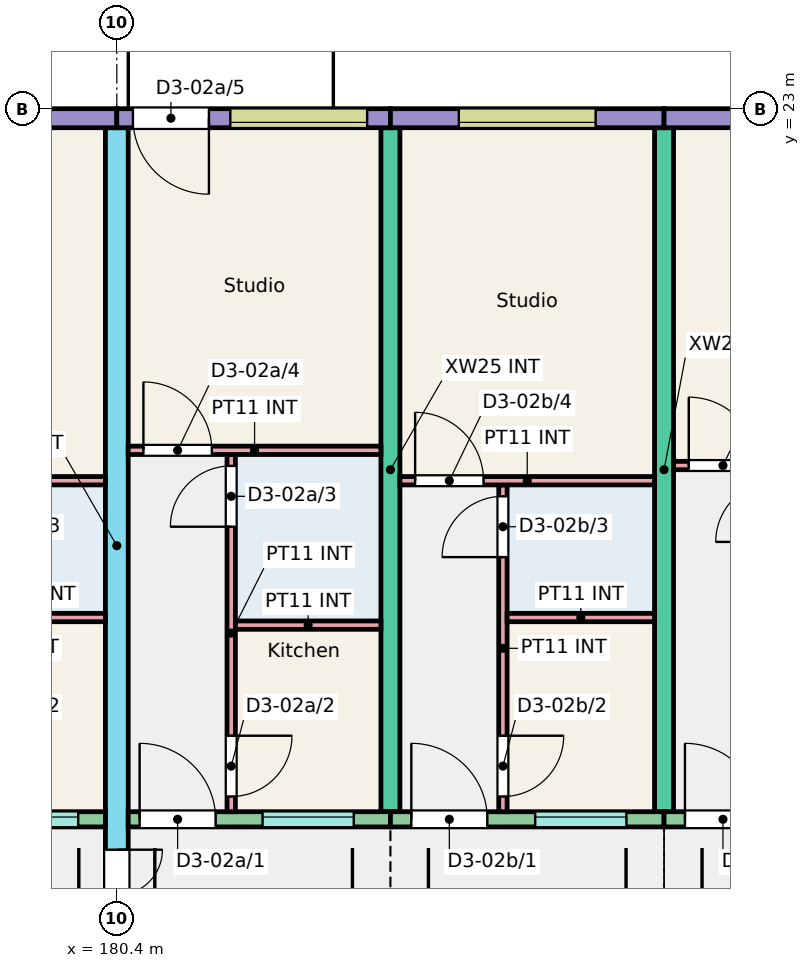
"""IFC4 building model, lengths in metres.
Left out: names, types, materials, properties, quantities, classifications, styles, units other than length and angle.
Written with IfcOpenShell. Run it as: python <this file> out.ifc"""

import sys

from ifc_helpers import new_model, si_unit, direction, frame, frame_2d, origin, place, context, subcontext, project, spatial, rectangle, extrude, element, fill, save


model = new_model("IFC4")
c1 = context("Model", 3, precision=1e-05, world=origin(), true_north=direction((0.0, 1.0)))
c2 = subcontext(c1, "Body", "Model", "MODEL_VIEW")
j1 = project(units=[si_unit("LENGTHUNIT", "METRE"), si_unit("PLANEANGLEUNIT", "RADIAN")], contexts=[c1])
p1 = place(None, origin())
s1 = spatial("IfcSite", under=j1, at=p1, CompositionType="ELEMENT")
p2 = place(p1, origin())
s2 = spatial("IfcBuilding", under=s1, at=p2, CompositionType="ELEMENT")
p3 = place(p2, frame((0.0, 0.0, 6.0)))
s3 = spatial("IfcBuildingStorey", under=s2, at=p3, CompositionType="ELEMENT", Elevation=6.0)
p4 = place(p3, frame((180.4, 11.75, 0.0), z_axis=(0.0, 0.0, 1.0), x_axis=(0.0, 1.0, 0.0)))
e1 = element("IfcWall", 1, at=p4, inside=s3, PredefinedType="SHEAR", context=c2, shape_type="SweptSolid", body=[
    extrude(rectangle(XDim=11.0, YDim=0.3, at=frame_2d((5.5, 0.0))), origin(), (0.0, 0.0, 1.0), 3.0),
])
p5 = place(p4, frame((0.3, 0.0, 0.0)))
e2 = element("IfcOpeningElement", 2, at=p5, cuts=e1, PredefinedType="OPENING", context=c2, shape_type="SweptSolid", body=[
    extrude(rectangle(XDim=1.2, YDim=2.1, at=frame_2d((0.6, 1.05))), frame((0.0, 0.16, 0.0), z_axis=(0.0, -1.0, 0.0), x_axis=(1.0, 0.0, 0.0)), (0.0, 0.0, 1.0), 0.32),
])
for number, where, z_axis, x_axis in (
    (3, (184.0, 13.75, 0.0), (0.0, 0.0, 1.0), (0.0, 1.0, 0.0)),
    (4, (187.6, 13.75, 0.0), (0.0, 0.0, 1.0), (0.0, 1.0, 0.0)),
):
    element("IfcWall", number, at=place(p3, frame(where, z_axis=z_axis, x_axis=x_axis)), inside=s3, PredefinedType="SHEAR", context=c2, shape_type="SweptSolid", body=[
        extrude(rectangle(XDim=9.0, YDim=0.25, at=frame_2d((4.5, 0.0))), origin(), (0.0, 0.0, 1.0), 3.0),
    ])
p6 = place(p3, frame((176.8, 22.875, 0.0), z_axis=(0.0, 0.0, 1.0), x_axis=(1.0, 0.0, 0.0)))
e5 = element("IfcWall", 5, at=p6, inside=s3, PredefinedType="SOLIDWALL", context=c2, shape_type="SweptSolid", body=[
    extrude(rectangle(XDim=3.6, YDim=0.25, at=frame_2d((1.8, 0.0))), origin(), (0.0, 0.0, 1.0), 3.0),
])
p7 = place(p6, frame((0.887, 0.0, 1.1)))
e6 = element("IfcOpeningElement", 6, at=p7, cuts=e5, PredefinedType="OPENING", context=c2, shape_type="SweptSolid", body=[
    extrude(rectangle(XDim=1.8, YDim=1.3, at=frame_2d((0.9, 0.65))), frame((0.0, 0.135, 0.0), z_axis=(0.0, -1.0, 0.0), x_axis=(1.0, 0.0, 0.0)), (0.0, 0.0, 1.0), 0.27),
])
p8 = place(p3, frame((176.8, 13.65, 0.0), z_axis=(0.0, 0.0, 1.0), x_axis=(1.0, 0.0, 0.0)))
e7 = element("IfcWall", 7, at=p8, inside=s3, PredefinedType="SOLIDWALL", context=c2, shape_type="SweptSolid", body=[
    extrude(rectangle(XDim=3.45, YDim=0.2, at=frame_2d((1.725, 0.0))), origin(), (0.0, 0.0, 1.0), 3.0),
])
p9 = place(p8, frame((1.893, 0.0, 1.1)))
e8 = element("IfcOpeningElement", 8, at=p9, cuts=e7, PredefinedType="OPENING", context=c2, shape_type="SweptSolid", body=[
    extrude(rectangle(XDim=1.2, YDim=1.3, at=frame_2d((0.6, 0.65))), frame((0.0, 0.11, 0.0), z_axis=(0.0, -1.0, 0.0), x_axis=(1.0, 0.0, 0.0)), (0.0, 0.0, 1.0), 0.22),
])
p10 = place(p8, frame((0.275, 0.0, 0.0)))
e9 = element("IfcOpeningElement", 9, at=p10, cuts=e7, PredefinedType="OPENING", context=c2, shape_type="SweptSolid", body=[
    extrude(rectangle(XDim=1.0, YDim=2.1, at=frame_2d((0.5, 1.05))), frame((0.0, 0.11, 0.0), z_axis=(0.0, -1.0, 0.0), x_axis=(1.0, 0.0, 0.0)), (0.0, 0.0, 1.0), 0.22),
])
p11 = place(p3, frame((180.4, 22.875, 0.0), z_axis=(0.0, 0.0, 1.0), x_axis=(1.0, 0.0, 0.0)))
e10 = element("IfcWall", 10, at=p11, inside=s3, PredefinedType="SOLIDWALL", context=c2, shape_type="SweptSolid", body=[
    extrude(rectangle(XDim=3.6, YDim=0.25, at=frame_2d((1.8, 0.0))), origin(), (0.0, 0.0, 1.0), 3.0),
])
p12 = place(p11, frame((1.493, 0.0, 1.1)))
e11 = element("IfcOpeningElement", 11, at=p12, cuts=e10, PredefinedType="OPENING", context=c2, shape_type="SweptSolid", body=[
    extrude(rectangle(XDim=1.8, YDim=1.3, at=frame_2d((0.9, 0.65))), frame((0.0, 0.135, 0.0), z_axis=(0.0, -1.0, 0.0), x_axis=(1.0, 0.0, 0.0)), (0.0, 0.0, 1.0), 0.27),
])
p13 = place(p11, frame((0.212, 0.0, 0.0)))
e12 = element("IfcOpeningElement", 12, at=p13, cuts=e10, PredefinedType="OPENING", context=c2, shape_type="SweptSolid", body=[
    extrude(rectangle(XDim=1.0, YDim=2.1, at=frame_2d((0.5, 1.05))), frame((0.0, 0.135, 0.0), z_axis=(0.0, -1.0, 0.0), x_axis=(1.0, 0.0, 0.0)), (0.0, 0.0, 1.0), 0.27),
])
p14 = place(p3, frame((180.55, 13.65, 0.0), z_axis=(0.0, 0.0, 1.0), x_axis=(1.0, 0.0, 0.0)))
e13 = element("IfcWall", 13, at=p14, inside=s3, PredefinedType="SOLIDWALL", context=c2, shape_type="SweptSolid", body=[
    extrude(rectangle(XDim=3.45, YDim=0.2, at=frame_2d((1.725, 0.0))), origin(), (0.0, 0.0, 1.0), 3.0),
])
p15 = place(p14, frame((1.768, 0.0, 1.1)))
e14 = element("IfcOpeningElement", 14, at=p15, cuts=e13, PredefinedType="OPENING", context=c2, shape_type="SweptSolid", body=[
    extrude(rectangle(XDim=1.2, YDim=1.3, at=frame_2d((0.6, 0.65))), frame((0.0, 0.11, 0.0), z_axis=(0.0, -1.0, 0.0), x_axis=(1.0, 0.0, 0.0)), (0.0, 0.0, 1.0), 0.22),
])
p16 = place(p14, frame((0.15, 0.0, 0.0)))
e15 = element("IfcOpeningElement", 15, at=p16, cuts=e13, PredefinedType="OPENING", context=c2, shape_type="SweptSolid", body=[
    extrude(rectangle(XDim=1.0, YDim=2.1, at=frame_2d((0.5, 1.05))), frame((0.0, 0.11, 0.0), z_axis=(0.0, -1.0, 0.0), x_axis=(1.0, 0.0, 0.0)), (0.0, 0.0, 1.0), 0.22),
])
p17 = place(p3, frame((184.0, 22.875, 0.0), z_axis=(0.0, 0.0, 1.0), x_axis=(1.0, 0.0, 0.0)))
e16 = element("IfcWall", 16, at=p17, inside=s3, PredefinedType="SOLIDWALL", context=c2, shape_type="SweptSolid", body=[
    extrude(rectangle(XDim=3.6, YDim=0.25, at=frame_2d((1.8, 0.0))), origin(), (0.0, 0.0, 1.0), 3.0),
])
p18 = place(p17, frame((0.9, 0.0, 1.1)))
e17 = element("IfcOpeningElement", 17, at=p18, cuts=e16, PredefinedType="OPENING", context=c2, shape_type="SweptSolid", body=[
    extrude(rectangle(XDim=1.8, YDim=1.3, at=frame_2d((0.9, 0.65))), frame((0.0, 0.135, 0.0), z_axis=(0.0, -1.0, 0.0), x_axis=(1.0, 0.0, 0.0)), (0.0, 0.0, 1.0), 0.27),
])
p19 = place(p3, frame((184.0, 13.65, 0.0), z_axis=(0.0, 0.0, 1.0), x_axis=(1.0, 0.0, 0.0)))
e18 = element("IfcWall", 18, at=p19, inside=s3, PredefinedType="SOLIDWALL", context=c2, shape_type="SweptSolid", body=[
    extrude(rectangle(XDim=3.6, YDim=0.2, at=frame_2d((1.8, 0.0))), origin(), (0.0, 0.0, 1.0), 3.0),
])
p20 = place(p19, frame((1.905, 0.0, 1.1)))
e19 = element("IfcOpeningElement", 19, at=p20, cuts=e18, PredefinedType="OPENING", context=c2, shape_type="SweptSolid", body=[
    extrude(rectangle(XDim=1.2, YDim=1.3, at=frame_2d((0.6, 0.65))), frame((0.0, 0.11, 0.0), z_axis=(0.0, -1.0, 0.0), x_axis=(1.0, 0.0, 0.0)), (0.0, 0.0, 1.0), 0.22),
])
p21 = place(p19, frame((0.275, 0.0, 0.0)))
e20 = element("IfcOpeningElement", 20, at=p21, cuts=e18, PredefinedType="OPENING", context=c2, shape_type="SweptSolid", body=[
    extrude(rectangle(XDim=1.0, YDim=2.1, at=frame_2d((0.5, 1.05))), frame((0.0, 0.11, 0.0), z_axis=(0.0, -1.0, 0.0), x_axis=(1.0, 0.0, 0.0)), (0.0, 0.0, 1.0), 0.22),
])
p22 = place(p3, frame((187.6, 22.875, 0.0), z_axis=(0.0, 0.0, 1.0), x_axis=(1.0, 0.0, 0.0)))
e21 = element("IfcWall", 21, at=p22, inside=s3, PredefinedType="SOLIDWALL", context=c2, shape_type="SweptSolid", body=[
    extrude(rectangle(XDim=3.6, YDim=0.25, at=frame_2d((1.8, 0.0))), origin(), (0.0, 0.0, 1.0), 3.0),
])
p23 = place(p22, frame((0.9, 0.0, 1.1)))
e22 = element("IfcOpeningElement", 22, at=p23, cuts=e21, PredefinedType="OPENING", context=c2, shape_type="SweptSolid", body=[
    extrude(rectangle(XDim=1.8, YDim=1.3, at=frame_2d((0.9, 0.65))), frame((0.0, 0.135, 0.0), z_axis=(0.0, -1.0, 0.0), x_axis=(1.0, 0.0, 0.0)), (0.0, 0.0, 1.0), 0.27),
])
p24 = place(p3, frame((187.6, 13.65, 0.0), z_axis=(0.0, 0.0, 1.0), x_axis=(1.0, 0.0, 0.0)))
e23 = element("IfcWall", 23, at=p24, inside=s3, PredefinedType="SOLIDWALL", context=c2, shape_type="SweptSolid", body=[
    extrude(rectangle(XDim=3.6, YDim=0.2, at=frame_2d((1.8, 0.0))), origin(), (0.0, 0.0, 1.0), 3.0),
])
p25 = place(p24, frame((1.905, 0.0, 1.1)))
e24 = element("IfcOpeningElement", 24, at=p25, cuts=e23, PredefinedType="OPENING", context=c2, shape_type="SweptSolid", body=[
    extrude(rectangle(XDim=1.2, YDim=1.3, at=frame_2d((0.6, 0.65))), frame((0.0, 0.11, 0.0), z_axis=(0.0, -1.0, 0.0), x_axis=(1.0, 0.0, 0.0)), (0.0, 0.0, 1.0), 0.22),
])
p26 = place(p24, frame((0.275, 0.0, 0.0)))
e25 = element("IfcOpeningElement", 25, at=p26, cuts=e23, PredefinedType="OPENING", context=c2, shape_type="SweptSolid", body=[
    extrude(rectangle(XDim=1.0, YDim=2.1, at=frame_2d((0.5, 1.05))), frame((0.0, 0.11, 0.0), z_axis=(0.0, -1.0, 0.0), x_axis=(1.0, 0.0, 0.0)), (0.0, 0.0, 1.0), 0.22),
])
p27 = place(p3, frame((178.335, 16.305, 0.0), z_axis=(0.0, 0.0, 1.0), x_axis=(1.0, 0.0, 0.0)))
e26 = element("IfcWall", 26, at=p27, inside=s3, PredefinedType="PARTITIONING", context=c2, shape_type="SweptSolid", body=[
    extrude(rectangle(XDim=1.915, YDim=0.11, at=frame_2d((0.958, 0.0))), origin(), (0.0, 0.0, 1.0), 2.8),
])
p28 = place(p3, frame((176.925, 18.105, 0.0), z_axis=(0.0, 0.0, 1.0), x_axis=(1.0, 0.0, 0.0)))
e27 = element("IfcWall", 27, at=p28, inside=s3, PredefinedType="PARTITIONING", context=c2, shape_type="SweptSolid", body=[
    extrude(rectangle(XDim=3.325, YDim=0.11, at=frame_2d((1.663, 0.0))), origin(), (0.0, 0.0, 1.0), 2.8),
])
p29 = place(p28, frame((0.2, 0.0, 0.0)))
e28 = element("IfcOpeningElement", 28, at=p29, cuts=e27, PredefinedType="OPENING", context=c2, shape_type="SweptSolid", body=[
    extrude(rectangle(XDim=0.9, YDim=2.1, at=frame_2d((0.45, 1.05))), frame((0.0, 0.065, 0.0), z_axis=(0.0, -1.0, 0.0), x_axis=(1.0, 0.0, 0.0)), (0.0, 0.0, 1.0), 0.13),
])
p30 = place(p3, frame((181.905, 13.75, 0.0), z_axis=(0.0, 0.0, 1.0), x_axis=(0.0, 1.0, 0.0)))
e29 = element("IfcWall", 29, at=p30, inside=s3, PredefinedType="PARTITIONING", context=c2, shape_type="SweptSolid", body=[
    extrude(rectangle(XDim=4.7, YDim=0.11, at=frame_2d((2.35, 0.0))), origin(), (0.0, 0.0, 1.0), 2.8),
])
p31 = place(p30, frame((0.2, 0.0, 0.0)))
e30 = element("IfcOpeningElement", 30, at=p31, cuts=e29, PredefinedType="OPENING", context=c2, shape_type="SweptSolid", body=[
    extrude(rectangle(XDim=0.8, YDim=2.1, at=frame_2d((0.4, 1.05))), frame((0.0, 0.065, 0.0), z_axis=(0.0, -1.0, 0.0), x_axis=(1.0, 0.0, 0.0)), (0.0, 0.0, 1.0), 0.13),
])
p32 = place(p30, frame((3.75, 0.0, 0.0)))
e31 = element("IfcOpeningElement", 31, at=p32, cuts=e29, PredefinedType="OPENING", context=c2, shape_type="SweptSolid", body=[
    extrude(rectangle(XDim=0.8, YDim=2.1, at=frame_2d((0.4, 1.05))), frame((0.0, 0.065, 0.0), z_axis=(0.0, -1.0, 0.0), x_axis=(1.0, 0.0, 0.0)), (0.0, 0.0, 1.0), 0.13),
])
p33 = place(p3, frame((181.96, 16.205, 0.0), z_axis=(0.0, 0.0, 1.0), x_axis=(1.0, 0.0, 0.0)))
e32 = element("IfcWall", 32, at=p33, inside=s3, PredefinedType="PARTITIONING", context=c2, shape_type="SweptSolid", body=[
    extrude(rectangle(XDim=1.915, YDim=0.11, at=frame_2d((0.958, 0.0))), origin(), (0.0, 0.0, 1.0), 2.8),
])
p34 = place(p3, frame((180.55, 18.505, 0.0), z_axis=(0.0, 0.0, 1.0), x_axis=(1.0, 0.0, 0.0)))
e33 = element("IfcWall", 33, at=p34, inside=s3, PredefinedType="PARTITIONING", context=c2, shape_type="SweptSolid", body=[
    extrude(rectangle(XDim=3.325, YDim=0.11, at=frame_2d((1.663, 0.0))), origin(), (0.0, 0.0, 1.0), 2.8),
])
p35 = place(p34, frame((0.2, 0.0, 0.0)))
e34 = element("IfcOpeningElement", 34, at=p35, cuts=e33, PredefinedType="OPENING", context=c2, shape_type="SweptSolid", body=[
    extrude(rectangle(XDim=0.9, YDim=2.1, at=frame_2d((0.45, 1.05))), frame((0.0, 0.065, 0.0), z_axis=(0.0, -1.0, 0.0), x_axis=(1.0, 0.0, 0.0)), (0.0, 0.0, 1.0), 0.13),
])
p36 = place(p3, frame((185.48, 13.75, 0.0), z_axis=(0.0, 0.0, 1.0), x_axis=(0.0, 1.0, 0.0)))
e35 = element("IfcWall", 35, at=p36, inside=s3, PredefinedType="PARTITIONING", context=c2, shape_type="SweptSolid", body=[
    extrude(rectangle(XDim=4.3, YDim=0.11, at=frame_2d((2.15, 0.0))), origin(), (0.0, 0.0, 1.0), 2.8),
])
p37 = place(p36, frame((0.2, 0.0, 0.0)))
e36 = element("IfcOpeningElement", 36, at=p37, cuts=e35, PredefinedType="OPENING", context=c2, shape_type="SweptSolid", body=[
    extrude(rectangle(XDim=0.8, YDim=2.1, at=frame_2d((0.4, 1.05))), frame((0.0, 0.065, 0.0), z_axis=(0.0, -1.0, 0.0), x_axis=(1.0, 0.0, 0.0)), (0.0, 0.0, 1.0), 0.13),
])
p38 = place(p36, frame((3.35, 0.0, 0.0)))
e37 = element("IfcOpeningElement", 37, at=p38, cuts=e35, PredefinedType="OPENING", context=c2, shape_type="SweptSolid", body=[
    extrude(rectangle(XDim=0.8, YDim=2.1, at=frame_2d((0.4, 1.05))), frame((0.0, 0.065, 0.0), z_axis=(0.0, -1.0, 0.0), x_axis=(1.0, 0.0, 0.0)), (0.0, 0.0, 1.0), 0.13),
])
p39 = place(p3, frame((185.535, 16.305, 0.0), z_axis=(0.0, 0.0, 1.0), x_axis=(1.0, 0.0, 0.0)))
e38 = element("IfcWall", 38, at=p39, inside=s3, PredefinedType="PARTITIONING", context=c2, shape_type="SweptSolid", body=[
    extrude(rectangle(XDim=1.94, YDim=0.11, at=frame_2d((0.97, 0.0))), origin(), (0.0, 0.0, 1.0), 2.8),
])
p40 = place(p3, frame((184.125, 18.105, 0.0), z_axis=(0.0, 0.0, 1.0), x_axis=(1.0, 0.0, 0.0)))
e39 = element("IfcWall", 39, at=p40, inside=s3, PredefinedType="PARTITIONING", context=c2, shape_type="SweptSolid", body=[
    extrude(rectangle(XDim=3.35, YDim=0.11, at=frame_2d((1.675, 0.0))), origin(), (0.0, 0.0, 1.0), 2.8),
])
p41 = place(p40, frame((0.2, 0.0, 0.0)))
e40 = element("IfcOpeningElement", 40, at=p41, cuts=e39, PredefinedType="OPENING", context=c2, shape_type="SweptSolid", body=[
    extrude(rectangle(XDim=0.9, YDim=2.1, at=frame_2d((0.45, 1.05))), frame((0.0, 0.065, 0.0), z_axis=(0.0, -1.0, 0.0), x_axis=(1.0, 0.0, 0.0)), (0.0, 0.0, 1.0), 0.13),
])
p42 = place(p3, frame((187.725, 18.305, 0.0), z_axis=(0.0, 0.0, 1.0), x_axis=(1.0, 0.0, 0.0)))
e41 = element("IfcWall", 41, at=p42, inside=s3, PredefinedType="PARTITIONING", context=c2, shape_type="SweptSolid", body=[
    extrude(rectangle(XDim=3.35, YDim=0.11, at=frame_2d((1.675, 0.0))), origin(), (0.0, 0.0, 1.0), 2.8),
])
p43 = place(p42, frame((0.2, 0.0, 0.0)))
e42 = element("IfcOpeningElement", 42, at=p43, cuts=e41, PredefinedType="OPENING", context=c2, shape_type="SweptSolid", body=[
    extrude(rectangle(XDim=0.9, YDim=2.1, at=frame_2d((0.45, 1.05))), frame((0.0, 0.065, 0.0), z_axis=(0.0, -1.0, 0.0), x_axis=(1.0, 0.0, 0.0)), (0.0, 0.0, 1.0), 0.13),
])
p44 = place(p9, origin())
e43 = element("IfcWindow", 43, at=p44, inside=s3, PartitioningType="SINGLE_PANEL", PredefinedType="WINDOW", context=c2, shape_type="SweptSolid", body=[
    extrude(rectangle(XDim=1.2, YDim=1.3, at=frame_2d((0.6, 0.65))), frame((0.0, 0.06, 0.0), z_axis=(0.0, -1.0, 0.0), x_axis=(1.0, 0.0, 0.0)), (0.0, 0.0, 1.0), 0.06),
])
fill(e8, e43)
p45 = place(p15, origin())
e44 = element("IfcWindow", 44, at=p45, inside=s3, PartitioningType="SINGLE_PANEL", PredefinedType="WINDOW", context=c2, shape_type="SweptSolid", body=[
    extrude(rectangle(XDim=1.2, YDim=1.3, at=frame_2d((0.6, 0.65))), frame((0.0, 0.06, 0.0), z_axis=(0.0, -1.0, 0.0), x_axis=(1.0, 0.0, 0.0)), (0.0, 0.0, 1.0), 0.06),
])
fill(e14, e44)
p46 = place(p12, origin())
e45 = element("IfcWindow", 45, at=p46, inside=s3, PartitioningType="SINGLE_PANEL", PredefinedType="WINDOW", context=c2, shape_type="SweptSolid", body=[
    extrude(rectangle(XDim=1.8, YDim=1.3, at=frame_2d((0.9, 0.65))), frame((0.0, -0.025, 0.0), z_axis=(0.0, -1.0, 0.0), x_axis=(1.0, 0.0, 0.0)), (0.0, 0.0, 1.0), 0.06),
])
fill(e11, e45)
p47 = place(p20, origin())
e46 = element("IfcWindow", 46, at=p47, inside=s3, PartitioningType="SINGLE_PANEL", PredefinedType="WINDOW", context=c2, shape_type="SweptSolid", body=[
    extrude(rectangle(XDim=1.2, YDim=1.3, at=frame_2d((0.6, 0.65))), frame((0.0, 0.06, 0.0), z_axis=(0.0, -1.0, 0.0), x_axis=(1.0, 0.0, 0.0)), (0.0, 0.0, 1.0), 0.06),
])
fill(e19, e46)
p48 = place(p18, origin())
e47 = element("IfcWindow", 47, at=p48, inside=s3, PartitioningType="SINGLE_PANEL", PredefinedType="WINDOW", context=c2, shape_type="SweptSolid", body=[
    extrude(rectangle(XDim=1.8, YDim=1.3, at=frame_2d((0.9, 0.65))), frame((0.0, -0.025, 0.0), z_axis=(0.0, -1.0, 0.0), x_axis=(1.0, 0.0, 0.0)), (0.0, 0.0, 1.0), 0.06),
])
fill(e17, e47)
p49 = place(p16, origin())
e48 = element("IfcDoor", 48, at=p49, inside=s3, OperationType="SINGLE_SWING_LEFT", PredefinedType="DOOR", context=c2, shape_type="SweptSolid", body=[
    extrude(rectangle(XDim=1.0, YDim=2.1, at=frame_2d((0.5, 1.05))), frame((0.0, 0.025, 0.0), z_axis=(0.0, -1.0, 0.0), x_axis=(1.0, 0.0, 0.0)), (0.0, 0.0, 1.0), 0.05),
])
fill(e15, e48)
p50 = place(p31, origin())
e49 = element("IfcDoor", 49, at=p50, inside=s3, OperationType="SINGLE_SWING_RIGHT", PredefinedType="DOOR", context=c2, shape_type="SweptSolid", body=[
    extrude(rectangle(XDim=0.8, YDim=2.1, at=frame_2d((0.4, 1.05))), frame((0.0, 0.025, 0.0), z_axis=(0.0, -1.0, 0.0), x_axis=(1.0, 0.0, 0.0)), (0.0, 0.0, 1.0), 0.05),
])
fill(e30, e49)
p51 = place(p32, origin())
e50 = element("IfcDoor", 50, at=p51, inside=s3, OperationType="SINGLE_SWING_LEFT", PredefinedType="DOOR", context=c2, shape_type="SweptSolid", body=[
    extrude(rectangle(XDim=0.8, YDim=2.1, at=frame_2d((0.4, 1.05))), frame((0.0, 0.025, 0.0), z_axis=(0.0, -1.0, 0.0), x_axis=(1.0, 0.0, 0.0)), (0.0, 0.0, 1.0), 0.05),
])
fill(e31, e50)
p52 = place(p35, origin())
e51 = element("IfcDoor", 51, at=p52, inside=s3, OperationType="SINGLE_SWING_LEFT", PredefinedType="DOOR", context=c2, shape_type="SweptSolid", body=[
    extrude(rectangle(XDim=0.9, YDim=2.1, at=frame_2d((0.45, 1.05))), frame((0.0, 0.025, 0.0), z_axis=(0.0, -1.0, 0.0), x_axis=(1.0, 0.0, 0.0)), (0.0, 0.0, 1.0), 0.05),
])
fill(e34, e51)
p53 = place(p13, origin())
e52 = element("IfcDoor", 52, at=p53, inside=s3, OperationType="SINGLE_SWING_RIGHT", PredefinedType="DOOR", context=c2, shape_type="SweptSolid", body=[
    extrude(rectangle(XDim=1.0, YDim=2.1, at=frame_2d((0.5, 1.05))), frame((0.0, 0.025, 0.0), z_axis=(0.0, -1.0, 0.0), x_axis=(1.0, 0.0, 0.0)), (0.0, 0.0, 1.0), 0.05),
])
fill(e12, e52)
p54 = place(p21, origin())
e53 = element("IfcDoor", 53, at=p54, inside=s3, OperationType="SINGLE_SWING_LEFT", PredefinedType="DOOR", context=c2, shape_type="SweptSolid", body=[
    extrude(rectangle(XDim=1.0, YDim=2.1, at=frame_2d((0.5, 1.05))), frame((0.0, 0.025, 0.0), z_axis=(0.0, -1.0, 0.0), x_axis=(1.0, 0.0, 0.0)), (0.0, 0.0, 1.0), 0.05),
])
fill(e20, e53)
p55 = place(p37, origin())
e54 = element("IfcDoor", 54, at=p55, inside=s3, OperationType="SINGLE_SWING_RIGHT", PredefinedType="DOOR", context=c2, shape_type="SweptSolid", body=[
    extrude(rectangle(XDim=0.8, YDim=2.1, at=frame_2d((0.4, 1.05))), frame((0.0, 0.025, 0.0), z_axis=(0.0, -1.0, 0.0), x_axis=(1.0, 0.0, 0.0)), (0.0, 0.0, 1.0), 0.05),
])
fill(e36, e54)
p56 = place(p38, origin())
e55 = element("IfcDoor", 55, at=p56, inside=s3, OperationType="SINGLE_SWING_LEFT", PredefinedType="DOOR", context=c2, shape_type="SweptSolid", body=[
    extrude(rectangle(XDim=0.8, YDim=2.1, at=frame_2d((0.4, 1.05))), frame((0.0, 0.025, 0.0), z_axis=(0.0, -1.0, 0.0), x_axis=(1.0, 0.0, 0.0)), (0.0, 0.0, 1.0), 0.05),
])
fill(e37, e55)
p57 = place(p41, origin())
e56 = element("IfcDoor", 56, at=p57, inside=s3, OperationType="SINGLE_SWING_LEFT", PredefinedType="DOOR", context=c2, shape_type="SweptSolid", body=[
    extrude(rectangle(XDim=0.9, YDim=2.1, at=frame_2d((0.45, 1.05))), frame((0.0, 0.025, 0.0), z_axis=(0.0, -1.0, 0.0), x_axis=(1.0, 0.0, 0.0)), (0.0, 0.0, 1.0), 0.05),
])
fill(e40, e56)
p58 = place(p26, origin())
e57 = element("IfcDoor", 57, at=p58, inside=s3, OperationType="SINGLE_SWING_LEFT", PredefinedType="DOOR", context=c2, shape_type="SweptSolid", body=[
    extrude(rectangle(XDim=1.0, YDim=2.1, at=frame_2d((0.5, 1.05))), frame((0.0, 0.025, 0.0), z_axis=(0.0, -1.0, 0.0), x_axis=(1.0, 0.0, 0.0)), (0.0, 0.0, 1.0), 0.05),
])
fill(e25, e57)
p59 = place(p43, origin())
e58 = element("IfcDoor", 58, at=p59, inside=s3, OperationType="SINGLE_SWING_LEFT", PredefinedType="DOOR", context=c2, shape_type="SweptSolid", body=[
    extrude(rectangle(XDim=0.9, YDim=2.1, at=frame_2d((0.45, 1.05))), frame((0.0, 0.025, 0.0), z_axis=(0.0, -1.0, 0.0), x_axis=(1.0, 0.0, 0.0)), (0.0, 0.0, 1.0), 0.05),
])
fill(e42, e58)
p60 = place(p5, origin())
e59 = element("IfcDoor", 59, at=p60, inside=s3, OperationType="DOUBLE_DOOR_SINGLE_SWING", PredefinedType="DOOR", context=c2, shape_type="SweptSolid", body=[
    extrude(rectangle(XDim=1.2, YDim=2.1, at=frame_2d((0.6, 1.05))), frame((0.0, 0.025, 0.0), z_axis=(0.0, -1.0, 0.0), x_axis=(1.0, 0.0, 0.0)), (0.0, 0.0, 1.0), 0.05),
])
fill(e2, e59)
save(model, sys.argv[1])
